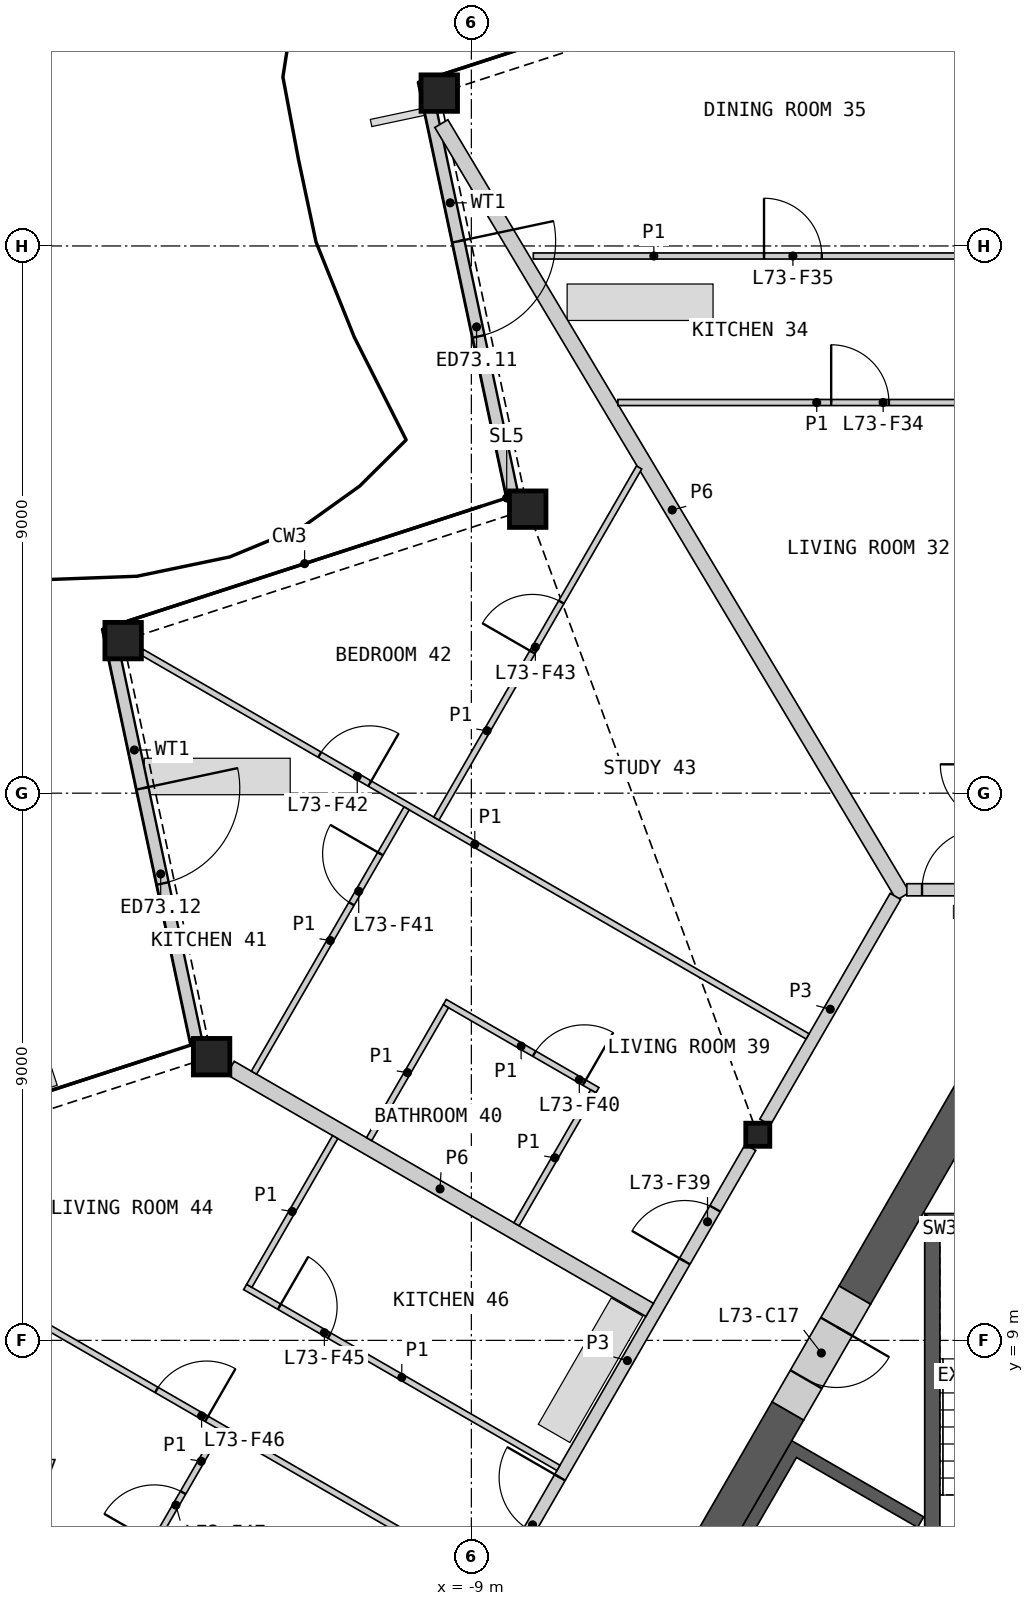
"""IFC4 building model, lengths in metres.
Left out: names, types, materials, properties, quantities, classifications, styles, units other than length and angle.
Written with IfcOpenShell. Run it as: python <this file> out.ifc"""

import sys

from ifc_helpers import new_model, si_unit, direction, frame, frame_2d, origin, origin_2d, place, context, subcontext, project, spatial, polyline, rectangle, hollow_rectangle, i_section, outline, extrude, element, fill, save


model = new_model("IFC4")
c1 = context("Model", 3, precision=1e-05, world=origin(), true_north=direction((0.0, 1.0)))
c2 = subcontext(c1, "Body", "Model", "MODEL_VIEW")
j1 = project(units=[si_unit("LENGTHUNIT", "METRE"), si_unit("PLANEANGLEUNIT", "RADIAN")], contexts=[c1])
p1 = place(None, origin())
s1 = spatial("IfcSite", under=j1, at=p1, CompositionType="ELEMENT")
p2 = place(p1, origin())
s2 = spatial("IfcBuilding", under=s1, at=p2, CompositionType="ELEMENT")
p3 = place(p2, frame((0.0, 0.0, 329.0)))
s3 = spatial("IfcBuildingStorey", under=s2, at=p3, CompositionType="ELEMENT", Elevation=329.0)
for number, where, z_axis, x_axis in (
    (1, (-9.527, 29.514, 0.0), (0.0, 0.0, 1.0), (1.0, 0.0, 0.0)),
    (2, (-8.073, 22.671, 0.0), (0.0, 0.0, 1.0), (1.0, 0.0, 0.0)),
    (3, (-14.727, 20.509, 0.0), (0.0, 0.0, 1.0), (1.0, 0.0, 0.0)),
    (4, (-13.272, 13.666, 0.0), (0.0, 0.0, 1.0), (1.0, 0.0, 0.0)),
):
    element("IfcColumn", number, at=place(p3, frame(where, z_axis=z_axis, x_axis=x_axis)), inside=s3, PredefinedType="COLUMN", context=c2, shape_type="SweptSolid", body=[
        extrude(hollow_rectangle(XDim=0.6, YDim=0.6, WallThickness=0.04, at=origin_2d()), origin(), (0.0, 0.0, 1.0), 3.4),
    ])
p4 = place(p3, frame((-4.289, 12.382, 0.0), z_axis=(0.0, 0.0, 1.0), x_axis=(1.0, 0.0, 0.0)))
e5 = element("IfcColumn", 5, at=p4, inside=s3, PredefinedType="COLUMN", context=c2, shape_type="SweptSolid", body=[
    extrude(i_section(OverallWidth=0.396, OverallDepth=0.381, WebThickness=0.019, FlangeThickness=0.03, at=origin_2d()), origin(), (0.0, 0.0, 1.0), 3.4),
])
p5 = place(p3, frame((-9.684, 29.289, 0.0), z_axis=(0.0, 0.0, 1.0), x_axis=(0.207920686021, -0.978145688701, 0.0)))
e6 = element("IfcWall", 6, at=p5, inside=s3, PredefinedType="SOLIDWALL", context=c2, shape_type="SweptSolid", body=[
    extrude(rectangle(XDim=6.459, YDim=0.2, at=frame_2d((3.229, 0.0))), origin(), (0.0, 0.0, 1.0), 2.488),
])
p6 = place(p5, frame((2.261, 0.0, 0.0)))
e7 = element("IfcOpeningElement", 7, at=p6, cuts=e6, PredefinedType="OPENING", context=c2, shape_type="SweptSolid", body=[
    extrude(rectangle(XDim=1.6, YDim=2.25, at=frame_2d((0.8, 1.125))), frame((0.0, 0.11, 0.0), z_axis=(0.0, -1.0, 0.0), x_axis=(1.0, 0.0, 0.0)), (0.0, 0.0, 1.0), 0.22),
])
p7 = place(p3, frame((-14.878, 20.292, 0.0), z_axis=(0.0, 0.0, 1.0), x_axis=(0.207943189785, -0.978140904892, 0.0)))
e8 = element("IfcWall", 8, at=p7, inside=s3, PredefinedType="SOLIDWALL", context=c2, shape_type="SweptSolid", body=[
    extrude(rectangle(XDim=6.467, YDim=0.2, at=frame_2d((3.233, 0.0))), origin(), (0.0, 0.0, 1.0), 2.488),
])
p8 = place(p7, frame((2.261, 0.0, 0.0)))
e9 = element("IfcOpeningElement", 9, at=p8, cuts=e8, PredefinedType="OPENING", context=c2, shape_type="SweptSolid", body=[
    extrude(rectangle(XDim=1.6, YDim=2.25, at=frame_2d((0.8, 1.125))), frame((0.0, 0.11, 0.0), z_axis=(0.0, -1.0, 0.0), x_axis=(1.0, 0.0, 0.0)), (0.0, 0.0, 1.0), 0.22),
])
p9 = place(p3, origin())
e10 = element("IfcWall", 10, at=p9, inside=s3, PredefinedType="SHEAR", context=c2, shape_type="SweptSolid", body=[
    extrude(outline(polyline([(-4.96, 0.208), (-7.131, 1.461), (-3.731, 7.35), (-1.561, 6.097), (-1.66, 5.924), (-3.652, 7.074), (-6.852, 1.531), (-4.861, 0.381), (-4.96, 0.208)])), origin(), (0.0, 0.0, 1.0), 3.1),
])
p10 = place(p3, origin())
e11 = element("IfcWall", 11, at=p10, inside=s3, PredefinedType="SHEAR", context=c2, shape_type="SweptSolid", body=[
    extrude(outline(polyline([(1.544, 11.087), (-1.544, 11.087), (-1.294, 10.837), (1.294, 10.837), (1.544, 11.087)])), origin(), (0.0, 0.0, 1.0), 3.1),
])
p11 = place(p3, origin())
e12 = element("IfcWall", 12, at=p11, inside=s3, PredefinedType="SHEAR", context=c2, shape_type="SweptSolid", body=[
    extrude(outline(polyline([(-1.294, 10.837), (-1.544, 11.087), (-1.544, 5.237), (-1.294, 5.237), (-1.294, 10.837)])), origin(), (0.0, 0.0, 1.0), 3.1),
])
p12 = place(p3, frame((-3.794, 7.84, 0.0), z_axis=(0.0, 0.0, 1.0), x_axis=(-0.499974747889, -0.866039982607, 0.0)))
e13 = element("IfcWall", 13, at=p12, inside=s3, PredefinedType="SHEAR", context=c2, shape_type="SweptSolid", body=[
    extrude(rectangle(XDim=7.092, YDim=0.6, at=frame_2d((3.546, 0.0))), origin(), (0.0, 0.0, 1.0), 3.1),
])
p13 = place(p3, frame((-0.26, 13.961, 0.0), z_axis=(0.0, 0.0, 1.0), x_axis=(-0.50000604952, -0.866021911064, 0.0)))
e14 = element("IfcWall", 14, at=p13, inside=s3, PredefinedType="SHEAR", context=c2, shape_type="SweptSolid", body=[
    extrude(rectangle(XDim=4.869, YDim=0.6, at=frame_2d((2.434, 0.0))), origin(), (0.0, 0.0, 1.0), 3.1),
])
p14 = place(p3, frame((-2.694, 9.745, 0.0), z_axis=(0.0, 0.0, 1.0), x_axis=(-0.50002983664, -0.866008176907, 0.0)))
e15 = element("IfcWall", 15, at=p14, inside=s3, PredefinedType="SHEAR", context=c2, shape_type="SweptSolid", body=[
    extrude(rectangle(XDim=2.2, YDim=0.6, at=frame_2d((1.1, 0.0))), origin(), (0.0, 0.0, 1.0), 3.1),
])
p15 = place(p14, frame((0.6, 0.0, 0.0)))
e16 = element("IfcOpeningElement", 16, at=p15, cuts=e15, PredefinedType="OPENING", context=c2, shape_type="SweptSolid", body=[
    extrude(rectangle(XDim=1.0, YDim=2.1, at=frame_2d((0.5, 1.05))), frame((0.0, 0.31, 0.0), z_axis=(0.0, -1.0, 0.0), x_axis=(1.0, 0.0, 0.0)), (0.0, 0.0, 1.0), 0.62),
])
p16 = place(p3, frame((-9.493, 29.012, 0.0), z_axis=(0.0, 0.0, 1.0), x_axis=(0.512967150926, -0.85840823742, 0.0)))
e17 = element("IfcWall", 17, at=p16, inside=s3, PredefinedType="PARTITIONING", context=c2, shape_type="SweptSolid", body=[
    extrude(rectangle(XDim=14.805, YDim=0.25, at=frame_2d((7.402, 0.0))), origin(), (0.0, 0.0, 1.0), 2.33),
])
p17 = place(p3, frame((-8.458, 5.16, 0.0), z_axis=(0.0, 0.0, 1.0), x_axis=(0.499984266882, 0.866034487114, 0.0)))
e18 = element("IfcWall", 18, at=p17, inside=s3, PredefinedType="PARTITIONING", context=c2, shape_type="SweptSolid", body=[
    extrude(rectangle(XDim=8.099, YDim=0.2, at=frame_2d((4.049, 0.0))), origin(), (0.0, 0.0, 1.0), 3.1),
])
p18 = place(p17, frame((5.935, 0.0, 0.0)))
e19 = element("IfcOpeningElement", 19, at=p18, cuts=e18, PredefinedType="OPENING", context=c2, shape_type="SweptSolid", body=[
    extrude(rectangle(XDim=1.0, YDim=2.1, at=frame_2d((0.5, 1.05))), frame((0.0, 0.11, 0.0), z_axis=(0.0, -1.0, 0.0), x_axis=(1.0, 0.0, 0.0)), (0.0, 0.0, 1.0), 0.22),
])
p19 = place(p17, frame((0.83, 0.0, 0.0)))
e20 = element("IfcOpeningElement", 20, at=p19, cuts=e18, PredefinedType="OPENING", context=c2, shape_type="SweptSolid", body=[
    extrude(rectangle(XDim=1.0, YDim=2.1, at=frame_2d((0.5, 1.05))), frame((0.0, 0.11, 0.0), z_axis=(0.0, -1.0, 0.0), x_axis=(1.0, 0.0, 0.0)), (0.0, 0.0, 1.0), 0.22),
])
p20 = place(p3, frame((-12.962, 13.482, 0.0), z_axis=(0.0, 0.0, 1.0), x_axis=(0.866022671543, -0.50000473235, 0.0)))
e21 = element("IfcWall", 21, at=p20, inside=s3, PredefinedType="PARTITIONING", context=c2, shape_type="SweptSolid", body=[
    extrude(rectangle(XDim=7.961, YDim=0.25, at=frame_2d((3.98, 0.0))), origin(), (0.0, 0.0, 1.0), 2.33),
])
p21 = place(p3, frame((-4.169, 12.59, 0.0), z_axis=(0.0, 0.0, 1.0), x_axis=(0.499978750566, 0.866037671803, 0.0)))
e22 = element("IfcWall", 22, at=p21, inside=s3, PredefinedType="PARTITIONING", context=c2, shape_type="SweptSolid", body=[
    extrude(rectangle(XDim=4.288, YDim=0.2, at=frame_2d((2.144, 0.0))), origin(), (0.0, 0.0, 1.0), 3.1),
])
p22 = place(p3, frame((-1.838, 16.411, 0.0), z_axis=(0.0, 0.0, 1.0), x_axis=(1.0, 0.0, 0.0)))
e23 = element("IfcWall", 23, at=p22, inside=s3, PredefinedType="PARTITIONING", context=c2, shape_type="SweptSolid", body=[
    extrude(rectangle(XDim=3.676, YDim=0.2, at=frame_2d((1.838, 0.0))), origin(), (0.0, 0.0, 1.0), 3.1),
])
p23 = place(p22, frame((0.25, 0.0, 0.0)))
e24 = element("IfcOpeningElement", 24, at=p23, cuts=e23, PredefinedType="OPENING", context=c2, shape_type="SweptSolid", body=[
    extrude(rectangle(XDim=1.0, YDim=2.1, at=frame_2d((0.5, 1.05))), frame((0.0, 0.11, 0.0), z_axis=(0.0, -1.0, 0.0), x_axis=(1.0, 0.0, 0.0)), (0.0, 0.0, 1.0), 0.22),
])
p24 = place(p3, frame((-14.417, 20.32, 0.0), z_axis=(0.0, 0.0, 1.0), x_axis=(0.866021216079, -0.500007253249, 0.0)))
e25 = element("IfcWall", 25, at=p24, inside=s3, PredefinedType="PARTITIONING", context=c2, shape_type="SweptSolid", body=[
    extrude(rectangle(XDim=12.639, YDim=0.1, at=frame_2d((6.32, 0.0))), origin(), (0.0, 0.0, 1.0), 2.33),
])
p25 = place(p24, frame((3.375, 0.0, 0.0)))
e26 = element("IfcOpeningElement", 26, at=p25, cuts=e25, PredefinedType="OPENING", context=c2, shape_type="SweptSolid", body=[
    extrude(rectangle(XDim=0.95, YDim=2.1, at=frame_2d((0.475, 1.05))), frame((0.0, 0.06, 0.0), z_axis=(0.0, -1.0, 0.0), x_axis=(1.0, 0.0, 0.0)), (0.0, 0.0, 1.0), 0.12),
])
p26 = place(p3, frame((-19.615, 11.325, 0.0), z_axis=(0.0, 0.0, 1.0), x_axis=(0.86602139559, -0.500006942333, 0.0)))
e27 = element("IfcWall", 27, at=p26, inside=s3, PredefinedType="PARTITIONING", context=c2, shape_type="SweptSolid", body=[
    extrude(rectangle(XDim=12.505, YDim=0.1, at=frame_2d((6.252, 0.0))), origin(), (0.0, 0.0, 1.0), 2.33),
])
p27 = place(p26, frame((6.28, 0.0, 0.0)))
e28 = element("IfcOpeningElement", 28, at=p27, cuts=e27, PredefinedType="OPENING", context=c2, shape_type="SweptSolid", body=[
    extrude(rectangle(XDim=0.95, YDim=2.1, at=frame_2d((0.475, 1.05))), frame((0.0, 0.06, 0.0), z_axis=(0.0, -1.0, 0.0), x_axis=(1.0, 0.0, 0.0)), (0.0, 0.0, 1.0), 0.12),
])
p28 = place(p3, frame((-7.981, 26.835, 0.0), z_axis=(0.0, 0.0, 1.0), x_axis=(1.0, 0.0, 0.0)))
e29 = element("IfcWall", 29, at=p28, inside=s3, PredefinedType="PARTITIONING", context=c2, shape_type="SweptSolid", body=[
    extrude(rectangle(XDim=7.931, YDim=0.1, at=frame_2d((3.966, 0.0))), origin(), (0.0, 0.0, 1.0), 2.33),
])
p29 = place(p28, frame((3.794, 0.0, 0.0)))
e30 = element("IfcOpeningElement", 30, at=p29, cuts=e29, PredefinedType="OPENING", context=c2, shape_type="SweptSolid", body=[
    extrude(rectangle(XDim=0.95, YDim=2.1, at=frame_2d((0.475, 1.05))), frame((0.0, 0.06, 0.0), z_axis=(0.0, -1.0, 0.0), x_axis=(1.0, 0.0, 0.0)), (0.0, 0.0, 1.0), 0.12),
])
p30 = place(p3, frame((-9.575, 17.583, 0.0), z_axis=(0.0, 0.0, 1.0), x_axis=(0.499998189891, 0.866026448849, 0.0)))
e31 = element("IfcWall", 31, at=p30, inside=s3, PredefinedType="PARTITIONING", context=c2, shape_type="SweptSolid", body=[
    extrude(rectangle(XDim=6.668, YDim=0.1, at=frame_2d((3.334, 0.0))), origin(), (0.0, 0.0, 1.0), 2.33),
])
p31 = place(p30, frame((3.16, 0.0, 0.0)))
e32 = element("IfcOpeningElement", 32, at=p31, cuts=e31, PredefinedType="OPENING", context=c2, shape_type="SweptSolid", body=[
    extrude(rectangle(XDim=0.95, YDim=2.1, at=frame_2d((0.475, 1.05))), frame((0.0, 0.06, 0.0), z_axis=(0.0, -1.0, 0.0), x_axis=(1.0, 0.0, 0.0)), (0.0, 0.0, 1.0), 0.12),
])
p32 = place(p3, frame((-6.59, 24.425, 0.0), z_axis=(0.0, 0.0, 1.0), x_axis=(1.0, 0.0, 0.0)))
e33 = element("IfcWall", 33, at=p32, inside=s3, PredefinedType="PARTITIONING", context=c2, shape_type="SweptSolid", body=[
    extrude(rectangle(XDim=6.54, YDim=0.1, at=frame_2d((3.27, 0.0))), origin(), (0.0, 0.0, 1.0), 2.33),
])
p33 = place(p32, frame((3.508, 0.0, 0.0)))
e34 = element("IfcOpeningElement", 34, at=p33, cuts=e33, PredefinedType="OPENING", context=c2, shape_type="SweptSolid", body=[
    extrude(rectangle(XDim=0.95, YDim=2.1, at=frame_2d((0.475, 1.05))), frame((0.0, 0.06, 0.0), z_axis=(0.0, -1.0, 0.0), x_axis=(1.0, 0.0, 0.0)), (0.0, 0.0, 1.0), 0.12),
])
p34 = place(p3, frame((-12.721, 9.878, 0.0), z_axis=(0.0, 0.0, 1.0), x_axis=(0.866027751316, -0.499995933934, 0.0)))
e35 = element("IfcWall", 35, at=p34, inside=s3, PredefinedType="PARTITIONING", context=c2, shape_type="SweptSolid", body=[
    extrude(rectangle(XDim=5.95, YDim=0.1, at=frame_2d((2.975, 0.0))), origin(), (0.0, 0.0, 1.0), 2.33),
])
p35 = place(p34, frame((0.65, 0.0, 0.0)))
e36 = element("IfcOpeningElement", 36, at=p35, cuts=e35, PredefinedType="OPENING", context=c2, shape_type="SweptSolid", body=[
    extrude(rectangle(XDim=0.95, YDim=2.1, at=frame_2d((0.475, 1.05))), frame((0.0, 0.06, 0.0), z_axis=(0.0, -1.0, 0.0), x_axis=(1.0, 0.0, 0.0)), (0.0, 0.0, 1.0), 0.12),
])
p36 = place(p3, frame((-12.575, 13.403, 0.0), z_axis=(0.0, 0.0, 1.0), x_axis=(0.499989096993, 0.866031698547, 0.0)))
e37 = element("IfcWall", 37, at=p36, inside=s3, PredefinedType="PARTITIONING", context=c2, shape_type="SweptSolid", body=[
    extrude(rectangle(XDim=5.02, YDim=0.1, at=frame_2d((2.51, 0.0))), origin(), (0.0, 0.0, 1.0), 2.33),
])
p37 = place(p36, frame((3.208, 0.0, 0.0)))
e38 = element("IfcOpeningElement", 38, at=p37, cuts=e37, PredefinedType="OPENING", context=c2, shape_type="SweptSolid", body=[
    extrude(rectangle(XDim=0.95, YDim=2.1, at=frame_2d((0.475, 1.05))), frame((0.0, 0.06, 0.0), z_axis=(0.0, -1.0, 0.0), x_axis=(1.0, 0.0, 0.0)), (0.0, 0.0, 1.0), 0.12),
])
p38 = place(p3, frame((-12.652, 9.897, 0.0), z_axis=(0.0, 0.0, 1.0), x_axis=(0.500024172624, 0.866011447264, 0.0)))
e39 = element("IfcWall", 39, at=p38, inside=s3, PredefinedType="PARTITIONING", context=c2, shape_type="SweptSolid", body=[
    extrude(rectangle(XDim=2.825, YDim=0.1, at=frame_2d((1.413, 0.0))), origin(), (0.0, 0.0, 1.0), 2.33),
])
p39 = place(p3, frame((-9.438, 14.565, 0.0), z_axis=(0.0, 0.0, 1.0), x_axis=(0.866032775405, -0.499987231761, 0.0)))
e40 = element("IfcWall", 40, at=p39, inside=s3, PredefinedType="PARTITIONING", context=c2, shape_type="SweptSolid", body=[
    extrude(rectangle(XDim=2.9, YDim=0.1, at=frame_2d((1.45, 0.0))), origin(), (0.0, 0.0, 1.0), 2.33),
])
p40 = place(p39, frame((1.7, 0.0, 0.0)))
e41 = element("IfcOpeningElement", 41, at=p40, cuts=e40, PredefinedType="OPENING", context=c2, shape_type="SweptSolid", body=[
    extrude(rectangle(XDim=0.95, YDim=2.1, at=frame_2d((0.475, 1.05))), frame((0.0, 0.06, 0.0), z_axis=(0.0, -1.0, 0.0), x_axis=(1.0, 0.0, 0.0)), (0.0, 0.0, 1.0), 0.12),
])
for number, where, z_axis, x_axis in (
    (42, (-10.682, 12.31, 0.0), (0.0, 0.0, 1.0), (0.5, 0.866, 0.0)),
    (43, (-8.257, 10.91, 0.0), (0.0, 0.0, 1.0), (0.5, 0.866, 0.0)),
):
    element("IfcWall", number, at=place(p3, frame(where, z_axis=z_axis, x_axis=x_axis)), inside=s3, PredefinedType="PARTITIONING", context=c2, shape_type="SweptSolid", body=[
        extrude(rectangle(XDim=2.525, YDim=0.1, at=frame_2d((1.262, 0.0))), origin(), (0.0, 0.0, 1.0), 2.33),
    ])
p41 = place(p3, frame((-14.341, 5.457, 0.0), z_axis=(0.0, 0.0, 1.0), x_axis=(0.499954846121, 0.866051471819, 0.0)))
e44 = element("IfcWall", 44, at=p41, inside=s3, PredefinedType="PARTITIONING", context=c2, shape_type="SweptSolid", body=[
    extrude(rectangle(XDim=2.395, YDim=0.1, at=frame_2d((1.197, 0.0))), origin(), (0.0, 0.0, 1.0), 2.33),
])
p42 = place(p41, frame((0.25, 0.0, 0.0)))
e45 = element("IfcOpeningElement", 45, at=p42, cuts=e44, PredefinedType="OPENING", context=c2, shape_type="SweptSolid", body=[
    extrude(rectangle(XDim=0.95, YDim=2.1, at=frame_2d((0.475, 1.05))), frame((0.0, 0.06, 0.0), z_axis=(0.0, -1.0, 0.0), x_axis=(1.0, 0.0, 0.0)), (0.0, 0.0, 1.0), 0.12),
])
p43 = place(p6, origin())
e46 = element("IfcDoor", 46, at=p43, inside=s3, OperationType="DOUBLE_DOOR_SINGLE_SWING", PredefinedType="DOOR", context=c2, shape_type="SweptSolid", body=[
    extrude(rectangle(XDim=1.6, YDim=2.25, at=frame_2d((0.8, 1.125))), frame((0.0, 0.025, 0.0), z_axis=(0.0, -1.0, 0.0), x_axis=(1.0, 0.0, 0.0)), (0.0, 0.0, 1.0), 0.05),
])
fill(e7, e46)
p44 = place(p8, origin())
e47 = element("IfcDoor", 47, at=p44, inside=s3, OperationType="DOUBLE_DOOR_SINGLE_SWING", PredefinedType="DOOR", context=c2, shape_type="SweptSolid", body=[
    extrude(rectangle(XDim=1.6, YDim=2.25, at=frame_2d((0.8, 1.125))), frame((0.0, 0.025, 0.0), z_axis=(0.0, -1.0, 0.0), x_axis=(1.0, 0.0, 0.0)), (0.0, 0.0, 1.0), 0.05),
])
fill(e9, e47)
p45 = place(p15, origin())
e48 = element("IfcDoor", 48, at=p45, inside=s3, OperationType="SINGLE_SWING_LEFT", PredefinedType="DOOR", context=c2, shape_type="SweptSolid", body=[
    extrude(rectangle(XDim=1.0, YDim=2.1, at=frame_2d((0.5, 1.05))), frame((0.0, 0.055, 0.0), z_axis=(0.0, -1.0, 0.0), x_axis=(1.0, 0.0, 0.0)), (0.0, 0.0, 1.0), 0.05),
])
fill(e16, e48)
p46 = place(p23, origin())
e49 = element("IfcDoor", 49, at=p46, inside=s3, OperationType="SINGLE_SWING_RIGHT", PredefinedType="DOOR", context=c2, shape_type="SweptSolid", body=[
    extrude(rectangle(XDim=1.0, YDim=2.1, at=frame_2d((0.5, 1.05))), frame((0.0, 0.025, 0.0), z_axis=(0.0, -1.0, 0.0), x_axis=(1.0, 0.0, 0.0)), (0.0, 0.0, 1.0), 0.05),
])
fill(e24, e49)
p47 = place(p33, origin())
e50 = element("IfcDoor", 50, at=p47, inside=s3, OperationType="SINGLE_SWING_LEFT", PredefinedType="DOOR", context=c2, shape_type="SweptSolid", body=[
    extrude(rectangle(XDim=0.95, YDim=2.1, at=frame_2d((0.475, 1.05))), frame((0.0, 0.025, 0.0), z_axis=(0.0, -1.0, 0.0), x_axis=(1.0, 0.0, 0.0)), (0.0, 0.0, 1.0), 0.05),
])
fill(e34, e50)
p48 = place(p29, origin())
e51 = element("IfcDoor", 51, at=p48, inside=s3, OperationType="SINGLE_SWING_LEFT", PredefinedType="DOOR", context=c2, shape_type="SweptSolid", body=[
    extrude(rectangle(XDim=0.95, YDim=2.1, at=frame_2d((0.475, 1.05))), frame((0.0, 0.025, 0.0), z_axis=(0.0, -1.0, 0.0), x_axis=(1.0, 0.0, 0.0)), (0.0, 0.0, 1.0), 0.05),
])
fill(e30, e51)
p49 = place(p18, origin())
e52 = element("IfcDoor", 52, at=p49, inside=s3, OperationType="SINGLE_SWING_LEFT", PredefinedType="DOOR", context=c2, shape_type="SweptSolid", body=[
    extrude(rectangle(XDim=1.0, YDim=2.1, at=frame_2d((0.5, 1.05))), frame((0.0, 0.025, 0.0), z_axis=(0.0, -1.0, 0.0), x_axis=(1.0, 0.0, 0.0)), (0.0, 0.0, 1.0), 0.05),
])
fill(e19, e52)
p50 = place(p40, origin())
e53 = element("IfcDoor", 53, at=p50, inside=s3, OperationType="SINGLE_SWING_RIGHT", PredefinedType="DOOR", context=c2, shape_type="SweptSolid", body=[
    extrude(rectangle(XDim=0.95, YDim=2.1, at=frame_2d((0.475, 1.05))), frame((0.0, 0.025, 0.0), z_axis=(0.0, -1.0, 0.0), x_axis=(1.0, 0.0, 0.0)), (0.0, 0.0, 1.0), 0.05),
])
fill(e41, e53)
p51 = place(p37, origin())
e54 = element("IfcDoor", 54, at=p51, inside=s3, OperationType="SINGLE_SWING_RIGHT", PredefinedType="DOOR", context=c2, shape_type="SweptSolid", body=[
    extrude(rectangle(XDim=0.95, YDim=2.1, at=frame_2d((0.475, 1.05))), frame((0.0, 0.025, 0.0), z_axis=(0.0, -1.0, 0.0), x_axis=(1.0, 0.0, 0.0)), (0.0, 0.0, 1.0), 0.05),
])
fill(e38, e54)
p52 = place(p25, origin())
e55 = element("IfcDoor", 55, at=p52, inside=s3, OperationType="SINGLE_SWING_RIGHT", PredefinedType="DOOR", context=c2, shape_type="SweptSolid", body=[
    extrude(rectangle(XDim=0.95, YDim=2.1, at=frame_2d((0.475, 1.05))), frame((0.0, 0.025, 0.0), z_axis=(0.0, -1.0, 0.0), x_axis=(1.0, 0.0, 0.0)), (0.0, 0.0, 1.0), 0.05),
])
fill(e26, e55)
p53 = place(p31, origin())
e56 = element("IfcDoor", 56, at=p53, inside=s3, OperationType="SINGLE_SWING_LEFT", PredefinedType="DOOR", context=c2, shape_type="SweptSolid", body=[
    extrude(rectangle(XDim=0.95, YDim=2.1, at=frame_2d((0.475, 1.05))), frame((0.0, 0.025, 0.0), z_axis=(0.0, -1.0, 0.0), x_axis=(1.0, 0.0, 0.0)), (0.0, 0.0, 1.0), 0.05),
])
fill(e32, e56)
p54 = place(p19, origin())
e57 = element("IfcDoor", 57, at=p54, inside=s3, OperationType="SINGLE_SWING_RIGHT", PredefinedType="DOOR", context=c2, shape_type="SweptSolid", body=[
    extrude(rectangle(XDim=1.0, YDim=2.1, at=frame_2d((0.5, 1.05))), frame((0.0, 0.025, 0.0), z_axis=(0.0, -1.0, 0.0), x_axis=(1.0, 0.0, 0.0)), (0.0, 0.0, 1.0), 0.05),
])
fill(e20, e57)
p55 = place(p35, origin())
e58 = element("IfcDoor", 58, at=p55, inside=s3, OperationType="SINGLE_SWING_LEFT", PredefinedType="DOOR", context=c2, shape_type="SweptSolid", body=[
    extrude(rectangle(XDim=0.95, YDim=2.1, at=frame_2d((0.475, 1.05))), frame((0.0, 0.025, 0.0), z_axis=(0.0, -1.0, 0.0), x_axis=(1.0, 0.0, 0.0)), (0.0, 0.0, 1.0), 0.05),
])
fill(e36, e58)
p56 = place(p27, origin())
e59 = element("IfcDoor", 59, at=p56, inside=s3, OperationType="SINGLE_SWING_RIGHT", PredefinedType="DOOR", context=c2, shape_type="SweptSolid", body=[
    extrude(rectangle(XDim=0.95, YDim=2.1, at=frame_2d((0.475, 1.05))), frame((0.0, 0.025, 0.0), z_axis=(0.0, -1.0, 0.0), x_axis=(1.0, 0.0, 0.0)), (0.0, 0.0, 1.0), 0.05),
])
fill(e28, e59)
p57 = place(p42, origin())
e60 = element("IfcDoor", 60, at=p57, inside=s3, OperationType="SINGLE_SWING_LEFT", PredefinedType="DOOR", context=c2, shape_type="SweptSolid", body=[
    extrude(rectangle(XDim=0.95, YDim=2.1, at=frame_2d((0.475, 1.05))), frame((0.0, 0.025, 0.0), z_axis=(0.0, -1.0, 0.0), x_axis=(1.0, 0.0, 0.0)), (0.0, 0.0, 1.0), 0.05),
])
fill(e45, e60)
save(model, sys.argv[1])
